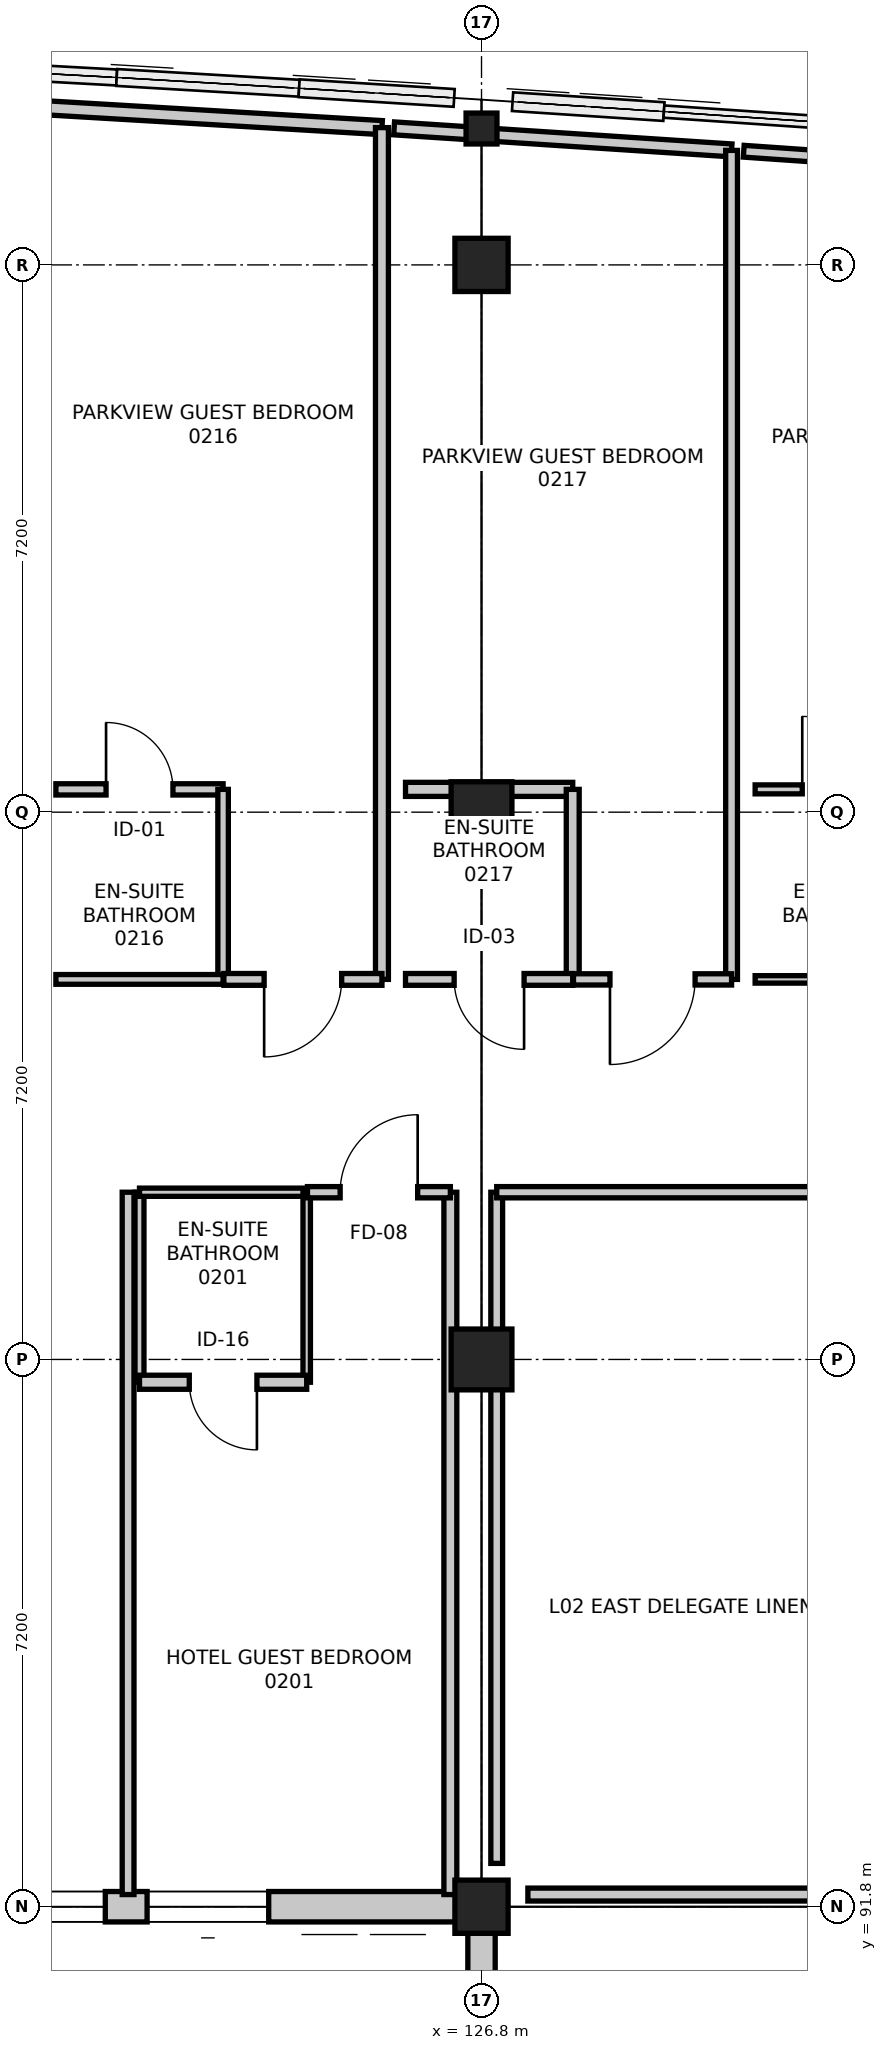
"""IFC4 building model, lengths in metres.
Left out: names, types, materials, properties, quantities, classifications, styles, units other than length and angle.
Written with IfcOpenShell. Run it as: python <this file> out.ifc"""

import sys

from ifc_helpers import new_model, si_unit, direction, frame, frame_2d, origin, origin_2d, place, context, subcontext, project, spatial, rectangle, hollow_circle, extrude, element, fill, save


model = new_model("IFC4")
c1 = context("Model", 3, precision=1e-05, world=origin(), true_north=direction((0.0, 1.0)))
c2 = subcontext(c1, "Body", "Model", "MODEL_VIEW")
j1 = project(units=[si_unit("LENGTHUNIT", "METRE"), si_unit("PLANEANGLEUNIT", "RADIAN")], contexts=[c1])
p1 = place(None, origin())
s1 = spatial("IfcSite", under=j1, at=p1, CompositionType="ELEMENT")
p2 = place(p1, origin())
s2 = spatial("IfcBuilding", under=s1, at=p2, CompositionType="ELEMENT")
p3 = place(p2, frame((0.0, 0.0, 10.5)))
s3 = spatial("IfcBuildingStorey", under=s2, at=p3, CompositionType="ELEMENT", Elevation=10.5)
p4 = place(p3, frame((126.8, 91.8, 0.0), z_axis=(0.0, 0.0, 1.0), x_axis=(1.0, 0.0, 0.0)))
e1 = element("IfcColumn", 1, at=p4, inside=s3, PredefinedType="COLUMN", context=c2, shape_type="SweptSolid", body=[
    extrude(rectangle(XDim=0.7, YDim=0.7, at=origin_2d()), origin(), (0.0, 0.0, 1.0), 4.5),
])
for number, where, z_axis, x_axis in (
    (2, (126.8, 99.0, -0.32), (0.0, 0.0, 1.0), (1.0, 0.0, 0.0)),
    (3, (126.8, 106.2, -0.32), (0.0, 0.0, 1.0), (1.0, 0.0, 0.0)),
):
    element("IfcColumn", number, at=place(p3, frame(where, z_axis=z_axis, x_axis=x_axis)), inside=s3, PredefinedType="COLUMN", context=c2, shape_type="SweptSolid", body=[
        extrude(rectangle(XDim=0.8, YDim=0.8, at=origin_2d()), origin(), (0.0, 0.0, 1.0), 4.82),
    ])
p5 = place(p3, frame((126.8, 113.4, 0.0), z_axis=(0.0, 0.0, 1.0), x_axis=(1.0, 0.0, 0.0)))
e4 = element("IfcColumn", 4, at=p5, inside=s3, PredefinedType="COLUMN", context=c2, shape_type="SweptSolid", body=[
    extrude(rectangle(XDim=0.7, YDim=0.7, at=origin_2d()), origin(), (0.0, 0.0, 1.0), 4.5),
])
p6 = place(p3, frame((126.8, 115.194, 0.0), z_axis=(0.0, 0.0, 1.0), x_axis=(1.0, 0.0, 0.0)))
e5 = element("IfcColumn", 5, at=p6, inside=s3, PredefinedType="COLUMN", context=c2, shape_type="SweptSolid", body=[
    extrude(hollow_circle(Radius=0.203, WallThickness=0.02, at=origin_2d()), origin(), (0.0, 0.0, 1.0), 4.5),
])
p7 = place(p3, frame((126.8, 84.6, 0.0), z_axis=(0.0, 0.0, 1.0), x_axis=(0.0, 1.0, 0.0)))
e6 = element("IfcWall", 6, at=p7, inside=s3, PredefinedType="STANDARD", context=c2, shape_type="SweptSolid", body=[
    extrude(rectangle(XDim=7.2, YDim=0.36, at=frame_2d((3.6, 0.0))), origin(), (0.0, 0.0, 1.0), 3.796),
])
p8 = place(p7, frame((2.95, 0.0, 0.9)))
e7 = element("IfcOpeningElement", 7, at=p8, cuts=e6, PredefinedType="OPENING", context=c2, shape_type="SweptSolid", body=[
    extrude(rectangle(XDim=1.3, YDim=1.95, at=frame_2d((0.65, 0.975))), frame((0.0, 0.19, 0.0), z_axis=(0.0, -1.0, 0.0), x_axis=(1.0, 0.0, 0.0)), (0.0, 0.0, 1.0), 0.38),
])
p9 = place(p3, frame((126.8, 91.8, 0.0), z_axis=(0.0, 0.0, 1.0), x_axis=(-1.0, 0.0, 0.0)))
e8 = element("IfcWall", 8, at=p9, inside=s3, PredefinedType="STANDARD", context=c2, shape_type="SweptSolid", body=[
    extrude(rectangle(XDim=7.2, YDim=0.4, at=frame_2d((3.6, 0.0))), origin(), (0.0, 0.0, 1.0), 3.455),
])
p10 = place(p9, frame((2.8, 0.0, 0.9)))
e9 = element("IfcOpeningElement", 9, at=p10, cuts=e8, PredefinedType="OPENING", context=c2, shape_type="SweptSolid", body=[
    extrude(rectangle(XDim=1.6, YDim=1.95, at=frame_2d((0.8, 0.975))), frame((0.0, 0.21, 0.0), z_axis=(0.0, -1.0, 0.0), x_axis=(1.0, 0.0, 0.0)), (0.0, 0.0, 1.0), 0.42),
])
p11 = place(p9, frame((4.95, 0.0, 0.85)))
e10 = element("IfcOpeningElement", 10, at=p11, cuts=e8, PredefinedType="OPENING", context=c2, shape_type="SweptSolid", body=[
    extrude(rectangle(XDim=1.2, YDim=1.8, at=frame_2d((0.6, 0.9))), frame((0.0, 0.21, 0.0), z_axis=(0.0, -1.0, 0.0), x_axis=(1.0, 0.0, 0.0)), (0.0, 0.0, 1.0), 0.42),
])
p12 = place(p3, frame((154.55, 91.96, 0.0), z_axis=(0.0, 0.0, 1.0), x_axis=(-1.0, 0.0, 0.0)))
e11 = element("IfcWall", 11, at=p12, inside=s3, PredefinedType="PARTITIONING", context=c2, shape_type="SweptSolid", body=[
    extrude(rectangle(XDim=27.14, YDim=0.17, at=frame_2d((13.57, 0.0))), origin(), (0.0, 0.0, 1.0), 3.455),
])
p13 = place(p3, frame((127.0, 92.37, 0.0), z_axis=(0.0, 0.0, 1.0), x_axis=(0.0, 1.0, 0.0)))
e12 = element("IfcWall", 12, at=p13, inside=s3, PredefinedType="PARTITIONING", context=c2, shape_type="SweptSolid", body=[
    extrude(rectangle(XDim=8.83, YDim=0.155, at=frame_2d((4.415, 0.0))), origin(), (0.0, 0.0, 1.0), 3.555),
])
p14 = place(p3, frame((127.0, 101.2, 0.0), z_axis=(0.0, 0.0, 1.0), x_axis=(1.0, 0.0, 0.0)))
e13 = element("IfcWall", 13, at=p14, inside=s3, PredefinedType="PARTITIONING", context=c2, shape_type="SweptSolid", body=[
    extrude(rectangle(XDim=8.19, YDim=0.148, at=frame_2d((4.095, 0.0))), origin(), (0.0, 0.0, 1.0), 3.555),
])
p15 = place(p3, frame((122.3, 98.7, 0.0), z_axis=(0.0, 0.0, 1.0), x_axis=(0.0, 1.0, 0.0)))
e14 = element("IfcWall", 14, at=p15, inside=s3, PredefinedType="PARTITIONING", context=c2, shape_type="SweptSolid", body=[
    extrude(rectangle(XDim=2.5, YDim=0.118, at=frame_2d((1.25, 0.0))), origin(), (0.0, 0.0, 1.0), 3.455),
])
p16 = place(p3, frame((122.3, 101.2, 0.0), z_axis=(0.0, 0.0, 1.0), x_axis=(1.0, 0.0, 0.0)))
e15 = element("IfcWall", 15, at=p16, inside=s3, PredefinedType="PARTITIONING", context=c2, shape_type="SweptSolid", body=[
    extrude(rectangle(XDim=2.2, YDim=0.108, at=frame_2d((1.1, 0.0))), origin(), (0.0, 0.0, 1.0), 4.22),
])
p17 = place(p3, frame((124.5, 101.2, 0.0), z_axis=(0.0, 0.0, 1.0), x_axis=(0.0, -1.0, 0.0)))
e16 = element("IfcWall", 16, at=p17, inside=s3, PredefinedType="PARTITIONING", context=c2, shape_type="SweptSolid", body=[
    extrude(rectangle(XDim=2.5, YDim=0.098, at=frame_2d((1.25, 0.0))), origin(), (0.0, 0.0, 1.0), 3.455),
])
p18 = place(p3, frame((124.5, 98.7, 0.0), z_axis=(0.0, 0.0, 1.0), x_axis=(-1.0, 0.0, 0.0)))
e17 = element("IfcWall", 17, at=p18, inside=s3, PredefinedType="PARTITIONING", context=c2, shape_type="SweptSolid", body=[
    extrude(rectangle(XDim=2.2, YDim=0.185, at=frame_2d((1.1, 0.0))), origin(), (0.0, 0.0, 1.0), 3.455),
])
p19 = place(p18, frame((0.655, 0.0, 0.0)))
e18 = element("IfcOpeningElement", 18, at=p19, cuts=e17, PredefinedType="OPENING", context=c2, shape_type="SweptSolid", body=[
    extrude(rectangle(XDim=0.89, YDim=2.09, at=frame_2d((0.445, 1.045))), frame((0.0, 0.103, 0.0), z_axis=(0.0, -1.0, 0.0), x_axis=(1.0, 0.0, 0.0)), (0.0, 0.0, 1.0), 0.205),
])
p20 = place(p3, frame((126.39, 101.2, 0.0), z_axis=(0.0, 0.0, 1.0), x_axis=(0.0, -1.0, 0.0)))
e19 = element("IfcWall", 19, at=p20, inside=s3, PredefinedType="PARTITIONING", context=c2, shape_type="SweptSolid", body=[
    extrude(rectangle(XDim=9.24, YDim=0.17, at=frame_2d((4.62, 0.0))), origin(), (0.0, 0.0, 1.0), 3.455),
])
p21 = place(p3, frame((122.15, 91.96, 0.0), z_axis=(0.0, 0.0, 1.0), x_axis=(0.0, 1.0, 0.0)))
e20 = element("IfcWall", 20, at=p21, inside=s3, PredefinedType="PARTITIONING", context=c2, shape_type="SweptSolid", body=[
    extrude(rectangle(XDim=9.24, YDim=0.155, at=frame_2d((4.62, 0.0))), origin(), (0.0, 0.0, 1.0), 3.455),
])
p22 = place(p3, frame((124.51, 101.2, 0.0), z_axis=(0.0, 0.0, 1.0), x_axis=(1.0, 0.0, 0.0)))
e21 = element("IfcWall", 21, at=p22, inside=s3, PredefinedType="PARTITIONING", context=c2, shape_type="SweptSolid", body=[
    extrude(rectangle(XDim=1.88, YDim=0.148, at=frame_2d((0.94, 0.0))), origin(), (0.0, 0.0, 1.0), 4.22),
])
p23 = place(p22, frame((0.43, 0.0, 0.0)))
e22 = element("IfcOpeningElement", 22, at=p23, cuts=e21, PredefinedType="OPENING", context=c2, shape_type="SweptSolid", body=[
    extrude(rectangle(XDim=1.02, YDim=2.15, at=frame_2d((0.51, 1.075))), frame((0.0, 0.084, 0.0), z_axis=(0.0, -1.0, 0.0), x_axis=(1.0, 0.0, 0.0)), (0.0, 0.0, 1.0), 0.168),
])
p24 = place(p3, frame((121.2, 106.5, 0.0), z_axis=(0.0, 0.0, 1.0), x_axis=(1.0, 0.0, 0.0)))
e23 = element("IfcWall", 23, at=p24, inside=s3, PredefinedType="PARTITIONING", context=c2, shape_type="SweptSolid", body=[
    extrude(rectangle(XDim=2.2, YDim=0.148, at=frame_2d((1.1, 0.0))), origin(), (0.0, 0.0, 1.0), 3.455),
])
p25 = place(p24, frame((0.66, 0.0, 0.0)))
e24 = element("IfcOpeningElement", 24, at=p25, cuts=e23, PredefinedType="OPENING", context=c2, shape_type="SweptSolid", body=[
    extrude(rectangle(XDim=0.88, YDim=2.06, at=frame_2d((0.44, 1.03))), frame((0.0, 0.084, 0.0), z_axis=(0.0, -1.0, 0.0), x_axis=(1.0, 0.0, 0.0)), (0.0, 0.0, 1.0), 0.168),
])
p26 = place(p3, frame((123.4, 106.5, 0.0), z_axis=(0.0, 0.0, 1.0), x_axis=(0.0, -1.0, 0.0)))
e25 = element("IfcWall", 25, at=p26, inside=s3, PredefinedType="PARTITIONING", context=c2, shape_type="SweptSolid", body=[
    extrude(rectangle(XDim=2.5, YDim=0.138, at=frame_2d((1.25, 0.0))), origin(), (0.0, 0.0, 1.0), 3.455),
])
p27 = place(p3, frame((123.4, 104.0, 0.0), z_axis=(0.0, 0.0, 1.0), x_axis=(-1.0, 0.0, 0.0)))
e26 = element("IfcWall", 26, at=p27, inside=s3, PredefinedType="PARTITIONING", context=c2, shape_type="SweptSolid", body=[
    extrude(rectangle(XDim=2.2, YDim=0.128, at=frame_2d((1.1, 0.0))), origin(), (0.0, 0.0, 1.0), 4.22),
])
p28 = place(p3, frame((121.05, 115.468, 0.0), z_axis=(0.0, 0.0, 1.0), x_axis=(0.998267172932, -0.058844298327, 0.0)))
e27 = element("IfcWall", 27, at=p28, inside=s3, PredefinedType="PARTITIONING", context=c2, shape_type="SweptSolid", body=[
    extrude(rectangle(XDim=4.448, YDim=0.185, at=frame_2d((2.224, 0.0))), origin(), (0.0, 0.0, 1.0), 3.796),
])
p29 = place(p3, frame((125.49, 115.206, 0.0), z_axis=(0.0, 0.0, 1.0), x_axis=(0.0, -1.0, 0.0)))
e28 = element("IfcWall", 28, at=p29, inside=s3, PredefinedType="PARTITIONING", context=c2, shape_type="SweptSolid", body=[
    extrude(rectangle(XDim=11.206, YDim=0.17, at=frame_2d((5.603, 0.0))), origin(), (0.0, 0.0, 1.0), 3.455),
])
p30 = place(p3, frame((125.49, 104.0, 0.0), z_axis=(0.0, 0.0, 1.0), x_axis=(-1.0, 0.0, 0.0)))
e29 = element("IfcWall", 29, at=p30, inside=s3, PredefinedType="PARTITIONING", context=c2, shape_type="SweptSolid", body=[
    extrude(rectangle(XDim=2.08, YDim=0.155, at=frame_2d((1.04, 0.0))), origin(), (0.0, 0.0, 1.0), 4.22),
])
p31 = place(p30, frame((0.53, 0.0, 0.0)))
e30 = element("IfcOpeningElement", 30, at=p31, cuts=e29, PredefinedType="OPENING", context=c2, shape_type="SweptSolid", body=[
    extrude(rectangle(XDim=1.02, YDim=2.15, at=frame_2d((0.51, 1.075))), frame((0.0, 0.087, 0.0), z_axis=(0.0, -1.0, 0.0), x_axis=(1.0, 0.0, 0.0)), (0.0, 0.0, 1.0), 0.175),
])
p32 = place(p3, frame((125.8, 106.5, 0.0), z_axis=(0.0, 0.0, 1.0), x_axis=(1.0, 0.0, 0.0)))
e31 = element("IfcWall", 31, at=p32, inside=s3, PredefinedType="PARTITIONING", context=c2, shape_type="SweptSolid", body=[
    extrude(rectangle(XDim=2.2, YDim=0.185, at=frame_2d((1.1, 0.0))), origin(), (0.0, 0.0, 1.0), 3.455),
])
p33 = place(p3, frame((128.0, 106.5, 0.0), z_axis=(0.0, 0.0, 1.0), x_axis=(0.0, -1.0, 0.0)))
e32 = element("IfcWall", 32, at=p33, inside=s3, PredefinedType="PARTITIONING", context=c2, shape_type="SweptSolid", body=[
    extrude(rectangle(XDim=2.5, YDim=0.17, at=frame_2d((1.25, 0.0))), origin(), (0.0, 0.0, 1.0), 3.455),
])
p34 = place(p3, frame((128.0, 104.0, 0.0), z_axis=(0.0, 0.0, 1.0), x_axis=(-1.0, 0.0, 0.0)))
e33 = element("IfcWall", 33, at=p34, inside=s3, PredefinedType="PARTITIONING", context=c2, shape_type="SweptSolid", body=[
    extrude(rectangle(XDim=2.2, YDim=0.155, at=frame_2d((1.1, 0.0))), origin(), (0.0, 0.0, 1.0), 3.555),
])
p35 = place(p34, frame((0.64, 0.0, 0.0)))
e34 = element("IfcOpeningElement", 34, at=p35, cuts=e33, PredefinedType="OPENING", context=c2, shape_type="SweptSolid", body=[
    extrude(rectangle(XDim=0.92, YDim=2.1, at=frame_2d((0.46, 1.05))), frame((0.0, 0.087, 0.0), z_axis=(0.0, -1.0, 0.0), x_axis=(1.0, 0.0, 0.0)), (0.0, 0.0, 1.0), 0.175),
])
p36 = place(p3, frame((125.65, 115.196, 0.0), z_axis=(0.0, 0.0, 1.0), x_axis=(0.997876928912, -0.065127833871, 0.0)))
e35 = element("IfcWall", 35, at=p36, inside=s3, PredefinedType="PARTITIONING", context=c2, shape_type="SweptSolid", body=[
    extrude(rectangle(XDim=4.45, YDim=0.17, at=frame_2d((2.225, 0.0))), origin(), (0.0, 0.0, 1.0), 3.796),
])
p37 = place(p3, frame((130.09, 114.906, 0.0), z_axis=(0.0, 0.0, 1.0), x_axis=(0.0, -1.0, 0.0)))
e36 = element("IfcWall", 36, at=p37, inside=s3, PredefinedType="PARTITIONING", context=c2, shape_type="SweptSolid", body=[
    extrude(rectangle(XDim=10.906, YDim=0.155, at=frame_2d((5.453, 0.0))), origin(), (0.0, 0.0, 1.0), 3.455),
])
p38 = place(p3, frame((130.09, 104.0, 0.0), z_axis=(0.0, 0.0, 1.0), x_axis=(-1.0, 0.0, 0.0)))
e37 = element("IfcWall", 37, at=p38, inside=s3, PredefinedType="PARTITIONING", context=c2, shape_type="SweptSolid", body=[
    extrude(rectangle(XDim=2.08, YDim=0.148, at=frame_2d((1.04, 0.0))), origin(), (0.0, 0.0, 1.0), 4.22),
])
p39 = place(p38, frame((0.48, 0.0, 0.0)))
e38 = element("IfcOpeningElement", 38, at=p39, cuts=e37, PredefinedType="OPENING", context=c2, shape_type="SweptSolid", body=[
    extrude(rectangle(XDim=1.12, YDim=2.2, at=frame_2d((0.56, 1.1))), frame((0.0, 0.084, 0.0), z_axis=(0.0, -1.0, 0.0), x_axis=(1.0, 0.0, 0.0)), (0.0, 0.0, 1.0), 0.168),
])
p40 = place(p3, frame((130.4, 106.5, 0.0), z_axis=(0.0, 0.0, 1.0), x_axis=(1.0, 0.0, 0.0)))
e39 = element("IfcWall", 39, at=p40, inside=s3, PredefinedType="PARTITIONING", context=c2, shape_type="SweptSolid", body=[
    extrude(rectangle(XDim=2.2, YDim=0.118, at=frame_2d((1.1, 0.0))), origin(), (0.0, 0.0, 1.0), 3.455),
])
p41 = place(p40, frame((0.62, 0.0, 0.0)))
e40 = element("IfcOpeningElement", 40, at=p41, cuts=e39, PredefinedType="OPENING", context=c2, shape_type="SweptSolid", body=[
    extrude(rectangle(XDim=0.96, YDim=2.14, at=frame_2d((0.48, 1.07))), frame((0.0, 0.069, 0.0), z_axis=(0.0, -1.0, 0.0), x_axis=(1.0, 0.0, 0.0)), (0.0, 0.0, 1.0), 0.138),
])
p42 = place(p3, frame((132.6, 104.0, 0.0), z_axis=(0.0, 0.0, 1.0), x_axis=(-1.0, 0.0, 0.0)))
e41 = element("IfcWall", 41, at=p42, inside=s3, PredefinedType="PARTITIONING", context=c2, shape_type="SweptSolid", body=[
    extrude(rectangle(XDim=2.2, YDim=0.098, at=frame_2d((1.1, 0.0))), origin(), (0.0, 0.0, 1.0), 4.22),
])
p43 = place(p3, frame((130.25, 114.896, 0.0), z_axis=(0.0, 0.0, 1.0), x_axis=(0.997593312197, -0.069336739614, 0.0)))
e42 = element("IfcWall", 42, at=p43, inside=s3, PredefinedType="PARTITIONING", context=c2, shape_type="SweptSolid", body=[
    extrude(rectangle(XDim=4.451, YDim=0.155, at=frame_2d((2.225, 0.0))), origin(), (0.0, 0.0, 1.0), 3.796),
])
p44 = place(p10, origin())
e43 = element("IfcWindow", 43, at=p44, inside=s3, PartitioningType="SINGLE_PANEL", PredefinedType="WINDOW", context=c2, shape_type="SweptSolid", body=[
    extrude(rectangle(XDim=1.6, YDim=1.95, at=frame_2d((0.8, 0.975))), frame((0.0, 0.03, 0.0), z_axis=(0.0, -1.0, 0.0), x_axis=(1.0, 0.0, 0.0)), (0.0, 0.0, 1.0), 0.06),
])
fill(e9, e43)
p45 = place(p11, origin())
e44 = element("IfcWindow", 44, at=p45, inside=s3, PartitioningType="SINGLE_PANEL", PredefinedType="WINDOW", context=c2, shape_type="SweptSolid", body=[
    extrude(rectangle(XDim=1.2, YDim=1.8, at=frame_2d((0.6, 0.9))), frame((0.0, 0.03, 0.0), z_axis=(0.0, -1.0, 0.0), x_axis=(1.0, 0.0, 0.0)), (0.0, 0.0, 1.0), 0.06),
])
fill(e10, e44)
p46 = place(p19, origin())
e45 = element("IfcDoor", 45, at=p46, inside=s3, OperationType="SINGLE_SWING_LEFT", PredefinedType="DOOR", context=c2, shape_type="SweptSolid", body=[
    extrude(rectangle(XDim=0.89, YDim=2.09, at=frame_2d((0.445, 1.045))), frame((0.0, 0.025, 0.0), z_axis=(0.0, -1.0, 0.0), x_axis=(1.0, 0.0, 0.0)), (0.0, 0.0, 1.0), 0.05),
])
fill(e18, e45)
p47 = place(p23, origin())
e46 = element("IfcDoor", 46, at=p47, inside=s3, OperationType="SINGLE_SWING_RIGHT", PredefinedType="DOOR", context=c2, shape_type="SweptSolid", body=[
    extrude(rectangle(XDim=1.02, YDim=2.15, at=frame_2d((0.51, 1.075))), frame((0.0, 0.025, 0.0), z_axis=(0.0, -1.0, 0.0), x_axis=(1.0, 0.0, 0.0)), (0.0, 0.0, 1.0), 0.05),
])
fill(e22, e46)
p48 = place(p25, origin())
e47 = element("IfcDoor", 47, at=p48, inside=s3, OperationType="SINGLE_SWING_LEFT", PredefinedType="DOOR", context=c2, shape_type="SweptSolid", body=[
    extrude(rectangle(XDim=0.88, YDim=2.06, at=frame_2d((0.44, 1.03))), frame((0.0, 0.025, 0.0), z_axis=(0.0, -1.0, 0.0), x_axis=(1.0, 0.0, 0.0)), (0.0, 0.0, 1.0), 0.05),
])
fill(e24, e47)
p49 = place(p31, origin())
e48 = element("IfcDoor", 48, at=p49, inside=s3, OperationType="SINGLE_SWING_RIGHT", PredefinedType="DOOR", context=c2, shape_type="SweptSolid", body=[
    extrude(rectangle(XDim=1.02, YDim=2.15, at=frame_2d((0.51, 1.075))), frame((0.0, 0.025, 0.0), z_axis=(0.0, -1.0, 0.0), x_axis=(1.0, 0.0, 0.0)), (0.0, 0.0, 1.0), 0.05),
])
fill(e30, e48)
p50 = place(p35, origin())
e49 = element("IfcDoor", 49, at=p50, inside=s3, OperationType="SINGLE_SWING_LEFT", PredefinedType="DOOR", context=c2, shape_type="SweptSolid", body=[
    extrude(rectangle(XDim=0.92, YDim=2.1, at=frame_2d((0.46, 1.05))), frame((0.0, 0.025, 0.0), z_axis=(0.0, -1.0, 0.0), x_axis=(1.0, 0.0, 0.0)), (0.0, 0.0, 1.0), 0.05),
])
fill(e34, e49)
p51 = place(p39, origin())
e50 = element("IfcDoor", 50, at=p51, inside=s3, OperationType="SINGLE_SWING_RIGHT", PredefinedType="DOOR", context=c2, shape_type="SweptSolid", body=[
    extrude(rectangle(XDim=1.12, YDim=2.2, at=frame_2d((0.56, 1.1))), frame((0.0, 0.025, 0.0), z_axis=(0.0, -1.0, 0.0), x_axis=(1.0, 0.0, 0.0)), (0.0, 0.0, 1.0), 0.05),
])
fill(e38, e50)
p52 = place(p41, origin())
e51 = element("IfcDoor", 51, at=p52, inside=s3, OperationType="SINGLE_SWING_LEFT", PredefinedType="DOOR", context=c2, shape_type="SweptSolid", body=[
    extrude(rectangle(XDim=0.96, YDim=2.14, at=frame_2d((0.48, 1.07))), frame((0.0, 0.025, 0.0), z_axis=(0.0, -1.0, 0.0), x_axis=(1.0, 0.0, 0.0)), (0.0, 0.0, 1.0), 0.05),
])
fill(e40, e51)
save(model, sys.argv[1])
